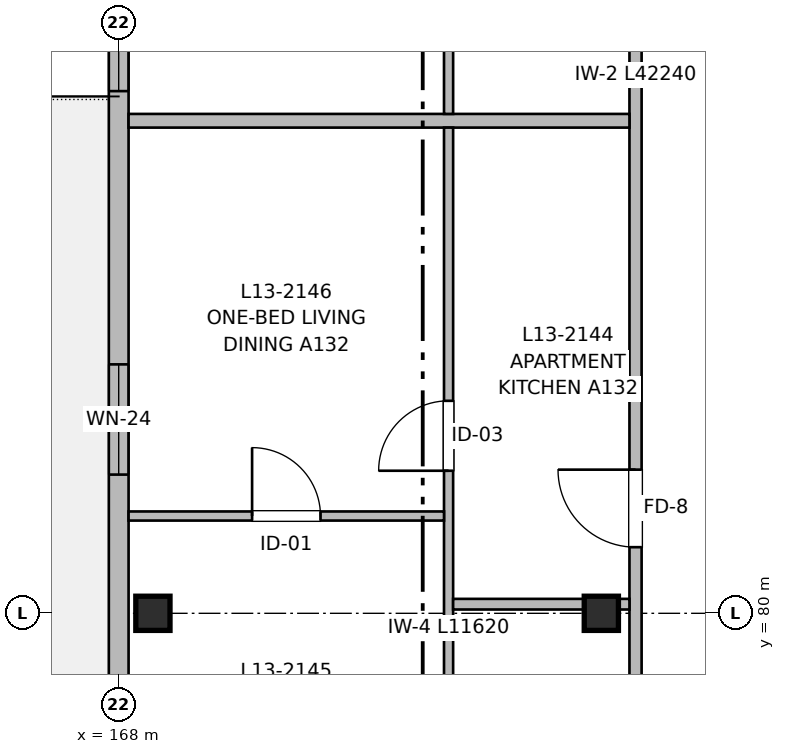
"""IFC4 building model, lengths in metres.
Left out: names, types, materials, properties, quantities, classifications, styles, units other than length and angle.
Written with IfcOpenShell. Run it as: python <this file> out.ifc"""

import sys

from ifc_helpers import new_model, si_unit, direction, frame, frame_2d, origin, origin_2d, place, context, subcontext, project, spatial, rectangle, extrude, element, fill, save


model = new_model("IFC4")
c1 = context("Model", 3, precision=1e-05, world=origin(), true_north=direction((0.0, 1.0)))
c2 = subcontext(c1, "Body", "Model", "MODEL_VIEW")
j1 = project(units=[si_unit("LENGTHUNIT", "METRE"), si_unit("PLANEANGLEUNIT", "RADIAN")], contexts=[c1])
p1 = place(None, origin())
s1 = spatial("IfcSite", under=j1, at=p1, CompositionType="ELEMENT")
p2 = place(p1, origin())
s2 = spatial("IfcBuilding", under=s1, at=p2, CompositionType="ELEMENT")
p3 = place(p2, frame((0.0, 0.0, 42.56)))
s3 = spatial("IfcBuildingStorey", under=s2, at=p3, CompositionType="ELEMENT", Elevation=42.56)
for number, where, z_axis, x_axis in (
    (1, (168.45, 80.0, 0.0), (0.0, 0.0, 1.0), (1.0, 0.0, 0.0)),
    (2, (174.35, 80.0, 0.0), (0.0, 0.0, 1.0), (1.0, 0.0, 0.0)),
):
    element("IfcColumn", number, at=place(p3, frame(where, z_axis=z_axis, x_axis=x_axis)), inside=s3, PredefinedType="COLUMN", context=c2, shape_type="SweptSolid", body=[
        extrude(rectangle(XDim=0.45, YDim=0.45, at=origin_2d()), origin(), (0.0, 0.0, 1.0), 3.2),
    ])
p4 = place(p3, frame((168.0, 64.4, 0.0), z_axis=(0.0, 0.0, 1.0), x_axis=(0.0, 1.0, 0.0)))
e3 = element("IfcWall", 3, at=p4, inside=s3, PredefinedType="SOLIDWALL", context=c2, shape_type="SweptSolid", body=[
    extrude(rectangle(XDim=23.6, YDim=0.26, at=frame_2d((11.8, 0.0))), origin(), (0.0, 0.0, 1.0), 2.98),
])
p5 = place(p4, frame((4.0, 0.0, 0.0)))
e4 = element("IfcOpeningElement", 4, at=p5, cuts=e3, PredefinedType="OPENING", context=c2, shape_type="SweptSolid", body=[
    extrude(rectangle(XDim=1.2, YDim=2.2, at=frame_2d((0.6, 1.1))), frame((0.0, 0.14, 0.0), z_axis=(0.0, -1.0, 0.0), x_axis=(1.0, 0.0, 0.0)), (0.0, 0.0, 1.0), 0.28),
])
p6 = place(p4, frame((7.2, 0.0, 0.9)))
e5 = element("IfcOpeningElement", 5, at=p6, cuts=e3, PredefinedType="OPENING", context=c2, shape_type="SweptSolid", body=[
    extrude(rectangle(XDim=0.65, YDim=0.95, at=frame_2d((0.325, 0.475))), frame((0.0, 0.14, 0.0), z_axis=(0.0, -1.0, 0.0), x_axis=(1.0, 0.0, 0.0)), (0.0, 0.0, 1.0), 0.28),
])
p7 = place(p4, frame((17.425, 0.0, 0.77)))
e6 = element("IfcOpeningElement", 6, at=p7, cuts=e3, PredefinedType="OPENING", context=c2, shape_type="SweptSolid", body=[
    extrude(rectangle(XDim=1.45, YDim=1.45, at=frame_2d((0.725, 0.725))), frame((0.0, 0.14, 0.0), z_axis=(0.0, -1.0, 0.0), x_axis=(1.0, 0.0, 0.0)), (0.0, 0.0, 1.0), 0.28),
])
p8 = place(p4, frame((12.85, 0.0, 0.82)))
e7 = element("IfcOpeningElement", 7, at=p8, cuts=e3, PredefinedType="OPENING", context=c2, shape_type="SweptSolid", body=[
    extrude(rectangle(XDim=1.5, YDim=1.4, at=frame_2d((0.75, 0.7))), frame((0.0, 0.14, 0.0), z_axis=(0.0, -1.0, 0.0), x_axis=(1.0, 0.0, 0.0)), (0.0, 0.0, 1.0), 0.28),
])
p9 = place(p4, frame((22.47, 0.0, 0.9)))
e8 = element("IfcOpeningElement", 8, at=p9, cuts=e3, PredefinedType="OPENING", context=c2, shape_type="SweptSolid", body=[
    extrude(rectangle(XDim=0.65, YDim=0.95, at=frame_2d((0.325, 0.475))), frame((0.0, 0.14, 0.0), z_axis=(0.0, -1.0, 0.0), x_axis=(1.0, 0.0, 0.0)), (0.0, 0.0, 1.0), 0.28),
])
p10 = place(p3, frame((174.8, 64.56, 0.0), z_axis=(0.0, 0.0, 1.0), x_axis=(0.0, 1.0, 0.0)))
e9 = element("IfcWall", 9, at=p10, inside=s3, PredefinedType="PARTITIONING", context=c2, shape_type="SweptSolid", body=[
    extrude(rectangle(XDim=42.24, YDim=0.16, at=frame_2d((21.12, 0.0))), origin(), (0.0, 0.0, 1.0), 2.935),
])
p11 = place(p10, frame((5.36, 0.0, 0.0)))
e10 = element("IfcOpeningElement", 10, at=p11, cuts=e9, PredefinedType="OPENING", context=c2, shape_type="SweptSolid", body=[
    extrude(rectangle(XDim=0.98, YDim=2.15, at=frame_2d((0.49, 1.075))), frame((0.0, 0.09, 0.0), z_axis=(0.0, -1.0, 0.0), x_axis=(1.0, 0.0, 0.0)), (0.0, 0.0, 1.0), 0.18),
])
p12 = place(p10, frame((16.31, 0.0, 0.0)))
e11 = element("IfcOpeningElement", 11, at=p12, cuts=e9, PredefinedType="OPENING", context=c2, shape_type="SweptSolid", body=[
    extrude(rectangle(XDim=1.02, YDim=2.15, at=frame_2d((0.51, 1.075))), frame((0.0, 0.09, 0.0), z_axis=(0.0, -1.0, 0.0), x_axis=(1.0, 0.0, 0.0)), (0.0, 0.0, 1.0), 0.18),
])
p13 = place(p10, frame((27.72, 0.0, 0.0)))
e12 = element("IfcOpeningElement", 12, at=p13, cuts=e9, PredefinedType="OPENING", context=c2, shape_type="SweptSolid", body=[
    extrude(rectangle(XDim=0.98, YDim=2.15, at=frame_2d((0.49, 1.075))), frame((0.0, 0.09, 0.0), z_axis=(0.0, -1.0, 0.0), x_axis=(1.0, 0.0, 0.0)), (0.0, 0.0, 1.0), 0.18),
])
p14 = place(p10, frame((37.95, 0.0, 0.0)))
e13 = element("IfcOpeningElement", 13, at=p14, cuts=e9, PredefinedType="OPENING", context=c2, shape_type="SweptSolid", body=[
    extrude(rectangle(XDim=0.98, YDim=2.15, at=frame_2d((0.49, 1.075))), frame((0.0, 0.09, 0.0), z_axis=(0.0, -1.0, 0.0), x_axis=(1.0, 0.0, 0.0)), (0.0, 0.0, 1.0), 0.18),
])
p15 = place(p3, frame((168.13, 86.48, 0.0), z_axis=(0.0, 0.0, 1.0), x_axis=(1.0, 0.0, 0.0)))
e14 = element("IfcWall", 14, at=p15, inside=s3, PredefinedType="PARTITIONING", context=c2, shape_type="SweptSolid", body=[
    extrude(rectangle(XDim=6.59, YDim=0.18, at=frame_2d((3.295, 0.0))), origin(), (0.0, 0.0, 1.0), 2.935),
])
p16 = place(p3, frame((172.34, 74.77, 0.0), z_axis=(0.0, 0.0, 1.0), x_axis=(0.0, 1.0, 0.0)))
e15 = element("IfcWall", 15, at=p16, inside=s3, PredefinedType="PARTITIONING", context=c2, shape_type="SweptSolid", body=[
    extrude(rectangle(XDim=11.62, YDim=0.12, at=frame_2d((5.81, 0.0))), origin(), (0.0, 0.0, 1.0), 2.935),
])
p17 = place(p16, frame((2.033, 0.0, 0.0)))
e16 = element("IfcOpeningElement", 16, at=p17, cuts=e15, PredefinedType="OPENING", context=c2, shape_type="SweptSolid", body=[
    extrude(rectangle(XDim=0.94, YDim=2.1, at=frame_2d((0.47, 1.05))), frame((0.0, 0.07, 0.0), z_axis=(0.0, -1.0, 0.0), x_axis=(1.0, 0.0, 0.0)), (0.0, 0.0, 1.0), 0.14),
])
p18 = place(p16, frame((7.106, 0.0, 0.0)))
e17 = element("IfcOpeningElement", 17, at=p18, cuts=e15, PredefinedType="OPENING", context=c2, shape_type="SweptSolid", body=[
    extrude(rectangle(XDim=0.92, YDim=2.1, at=frame_2d((0.46, 1.05))), frame((0.0, 0.07, 0.0), z_axis=(0.0, -1.0, 0.0), x_axis=(1.0, 0.0, 0.0)), (0.0, 0.0, 1.0), 0.14),
])
p19 = place(p3, frame((172.4, 80.12, 0.0), z_axis=(0.0, 0.0, 1.0), x_axis=(1.0, 0.0, 0.0)))
e18 = element("IfcWall", 18, at=p19, inside=s3, PredefinedType="PARTITIONING", context=c2, shape_type="SweptSolid", body=[
    extrude(rectangle(XDim=2.32, YDim=0.14, at=frame_2d((1.16, 0.0))), origin(), (0.0, 0.0, 1.0), 2.53),
])
p20 = place(p3, frame((168.13, 81.28, 0.0), z_axis=(0.0, 0.0, 1.0), x_axis=(1.0, 0.0, 0.0)))
e19 = element("IfcWall", 19, at=p20, inside=s3, PredefinedType="PARTITIONING", context=c2, shape_type="SweptSolid", body=[
    extrude(rectangle(XDim=4.15, YDim=0.12, at=frame_2d((2.075, 0.0))), origin(), (0.0, 0.0, 1.0), 2.935),
])
p21 = place(p20, frame((1.625, 0.0, 0.0)))
e20 = element("IfcOpeningElement", 20, at=p21, cuts=e19, PredefinedType="OPENING", context=c2, shape_type="SweptSolid", body=[
    extrude(rectangle(XDim=0.9, YDim=2.1, at=frame_2d((0.45, 1.05))), frame((0.0, 0.07, 0.0), z_axis=(0.0, -1.0, 0.0), x_axis=(1.0, 0.0, 0.0)), (0.0, 0.0, 1.0), 0.14),
])
p22 = place(p3, frame((172.34, 86.57, 0.0), z_axis=(0.0, 0.0, 1.0), x_axis=(0.0, 1.0, 0.0)))
e21 = element("IfcWall", 21, at=p22, inside=s3, PredefinedType="PARTITIONING", context=c2, shape_type="SweptSolid", body=[
    extrude(rectangle(XDim=10.78, YDim=0.12, at=frame_2d((5.39, 0.0))), origin(), (0.0, 0.0, 1.0), 2.935),
])
p23 = place(p22, frame((1.885, 0.0, 0.0)))
e22 = element("IfcOpeningElement", 22, at=p23, cuts=e21, PredefinedType="OPENING", context=c2, shape_type="SweptSolid", body=[
    extrude(rectangle(XDim=0.86, YDim=2.1, at=frame_2d((0.43, 1.05))), frame((0.0, 0.07, 0.0), z_axis=(0.0, -1.0, 0.0), x_axis=(1.0, 0.0, 0.0)), (0.0, 0.0, 1.0), 0.14),
])
p24 = place(p22, frame((6.59, 0.0, 0.0)))
e23 = element("IfcOpeningElement", 23, at=p24, cuts=e21, PredefinedType="OPENING", context=c2, shape_type="SweptSolid", body=[
    extrude(rectangle(XDim=0.92, YDim=2.1, at=frame_2d((0.46, 1.05))), frame((0.0, 0.07, 0.0), z_axis=(0.0, -1.0, 0.0), x_axis=(1.0, 0.0, 0.0)), (0.0, 0.0, 1.0), 0.14),
])
p25 = place(p7, origin())
e24 = element("IfcWindow", 24, at=p25, inside=s3, PartitioningType="SINGLE_PANEL", PredefinedType="WINDOW", context=c2, shape_type="SweptSolid", body=[
    extrude(rectangle(XDim=1.45, YDim=1.45, at=frame_2d((0.725, 0.725))), frame((0.0, 0.03, 0.0), z_axis=(0.0, -1.0, 0.0), x_axis=(1.0, 0.0, 0.0)), (0.0, 0.0, 1.0), 0.06),
])
fill(e6, e24)
p26 = place(p18, origin())
e25 = element("IfcDoor", 25, at=p26, inside=s3, OperationType="SINGLE_SWING_LEFT", PredefinedType="DOOR", context=c2, shape_type="SweptSolid", body=[
    extrude(rectangle(XDim=0.92, YDim=2.1, at=frame_2d((0.46, 1.05))), frame((0.0, 0.025, 0.0), z_axis=(0.0, -1.0, 0.0), x_axis=(1.0, 0.0, 0.0)), (0.0, 0.0, 1.0), 0.05),
])
fill(e17, e25)
p27 = place(p12, origin())
e26 = element("IfcDoor", 26, at=p27, inside=s3, OperationType="SINGLE_SWING_RIGHT", PredefinedType="DOOR", context=c2, shape_type="SweptSolid", body=[
    extrude(rectangle(XDim=1.02, YDim=2.15, at=frame_2d((0.51, 1.075))), frame((0.0, 0.025, 0.0), z_axis=(0.0, -1.0, 0.0), x_axis=(1.0, 0.0, 0.0)), (0.0, 0.0, 1.0), 0.05),
])
fill(e11, e26)
p28 = place(p21, origin())
e27 = element("IfcDoor", 27, at=p28, inside=s3, OperationType="SINGLE_SWING_LEFT", PredefinedType="DOOR", context=c2, shape_type="SweptSolid", body=[
    extrude(rectangle(XDim=0.9, YDim=2.1, at=frame_2d((0.45, 1.05))), frame((0.0, 0.025, 0.0), z_axis=(0.0, -1.0, 0.0), x_axis=(1.0, 0.0, 0.0)), (0.0, 0.0, 1.0), 0.05),
])
fill(e20, e27)
p29 = place(p9, origin())
e28 = element("IfcWindow", 28, at=p29, inside=s3, PartitioningType="SINGLE_PANEL", PredefinedType="WINDOW", context=c2, shape_type="SweptSolid", body=[
    extrude(rectangle(XDim=0.65, YDim=0.95, at=frame_2d((0.325, 0.475))), frame((0.0, 0.03, 0.0), z_axis=(0.0, -1.0, 0.0), x_axis=(1.0, 0.0, 0.0)), (0.0, 0.0, 1.0), 0.06),
])
fill(e8, e28)
save(model, sys.argv[1])
